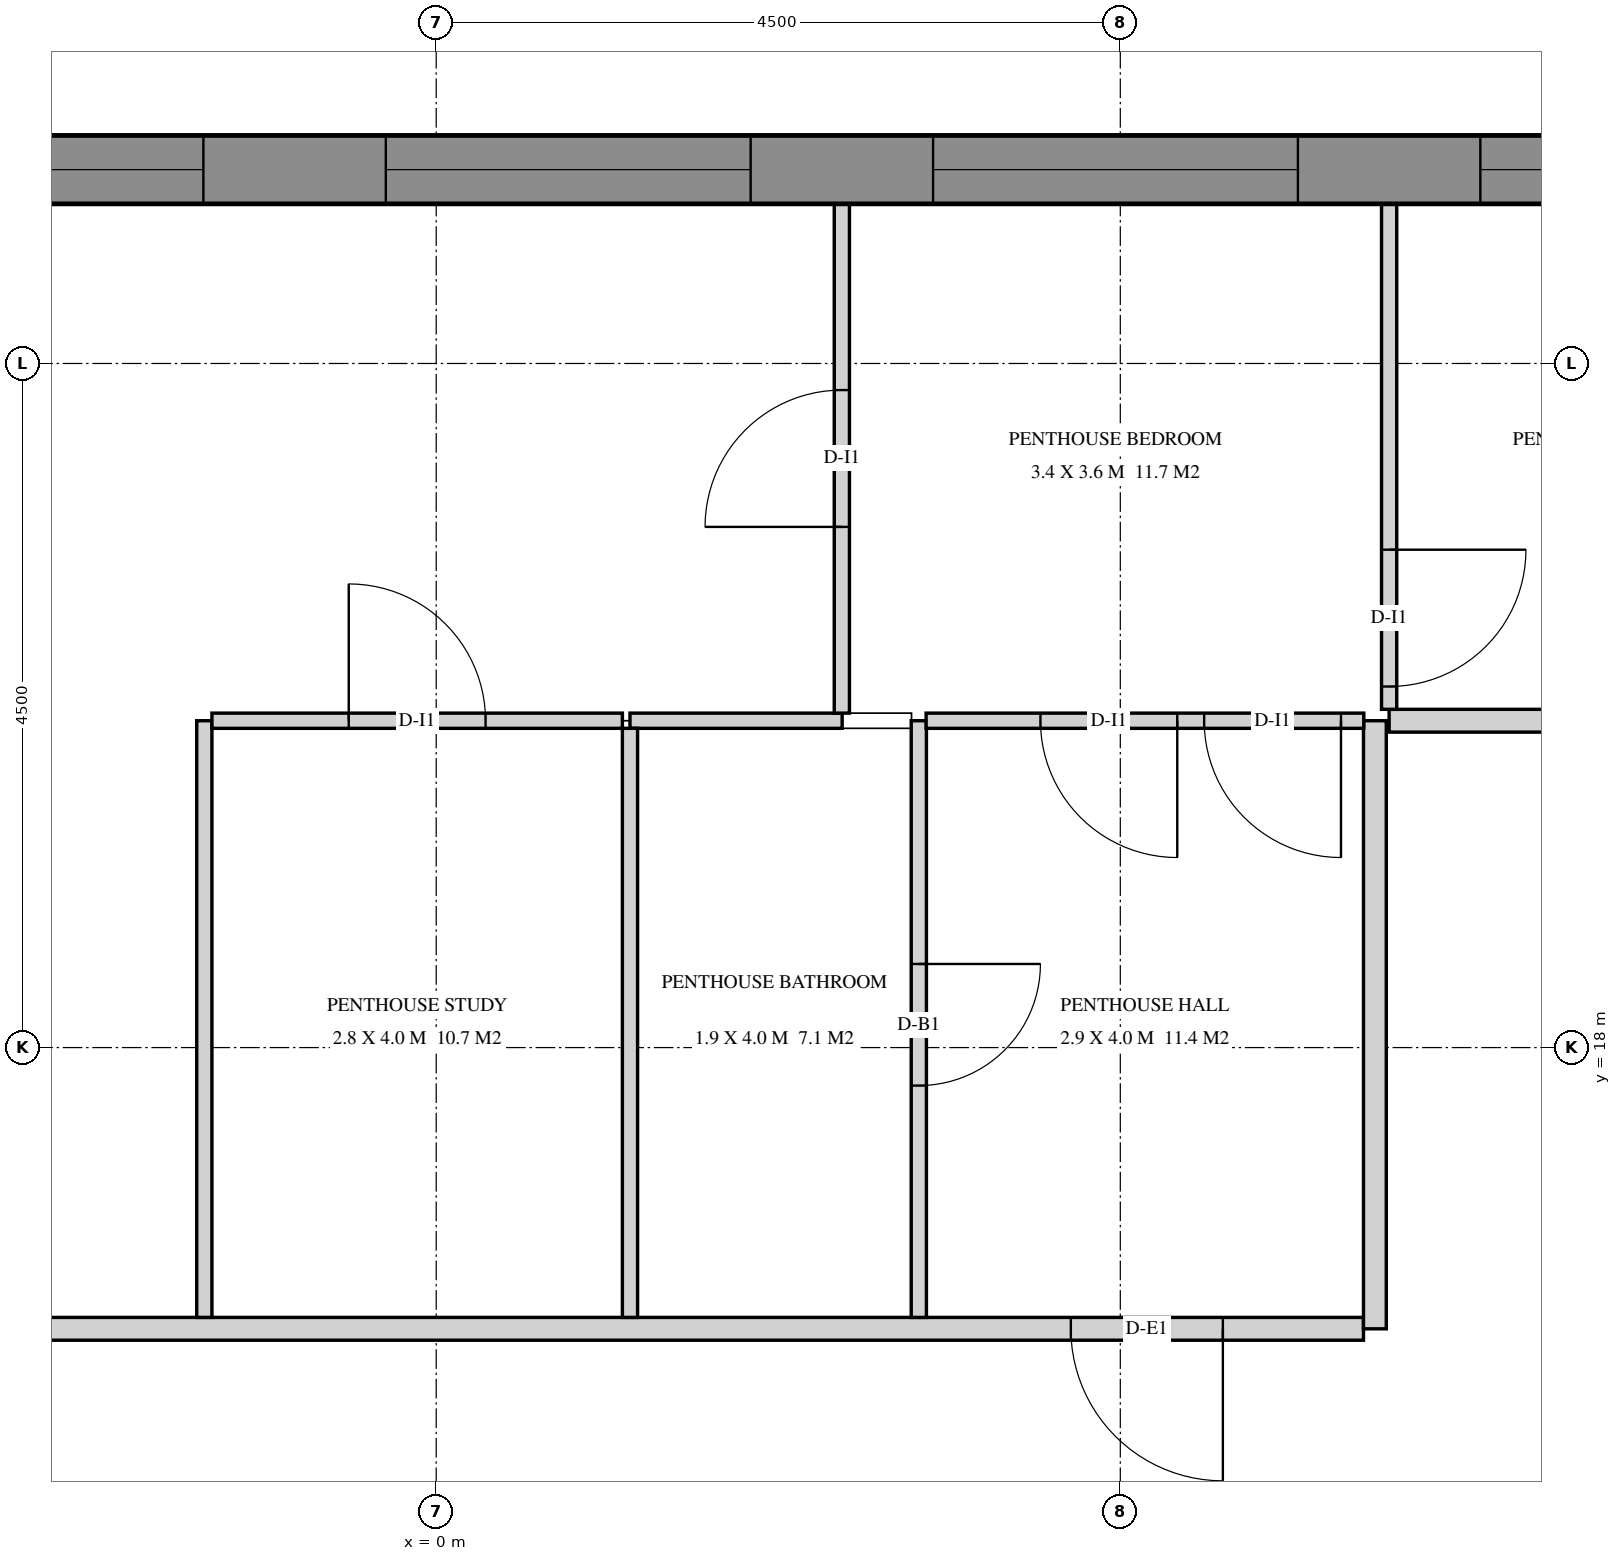
"""IFC4 building model, lengths in metres.
Left out: names, types, materials, properties, quantities, classifications, styles, units other than length and angle.
Written with IfcOpenShell. Run it as: python <this file> out.ifc"""

import sys

from ifc_helpers import new_model, si_unit, direction, frame, frame_2d, origin, place, context, subcontext, project, spatial, polyline, rectangle, outline, extrude, element, fill, save


model = new_model("IFC4")
c1 = context("Model", 3, precision=1e-05, world=origin(), true_north=direction((0.0, 1.0)))
c2 = subcontext(c1, "Body", "Model", "MODEL_VIEW")
j1 = project(units=[si_unit("LENGTHUNIT", "METRE"), si_unit("PLANEANGLEUNIT", "RADIAN")], contexts=[c1])
p1 = place(None, origin())
s1 = spatial("IfcSite", under=j1, at=p1, CompositionType="ELEMENT")
p2 = place(p1, origin())
s2 = spatial("IfcBuilding", under=s1, at=p2, CompositionType="ELEMENT")
p3 = place(p2, frame((0.0, 0.0, 349.5)))
s3 = spatial("IfcBuildingStorey", under=s2, at=p3, CompositionType="ELEMENT", Elevation=349.5)
p4 = place(p3, frame((10.634, 23.775, 0.0), z_axis=(0.0, 0.0, 1.0), x_axis=(-1.0, 0.0, 0.0)))
e1 = element("IfcWall", 1, at=p4, inside=s3, PredefinedType="SOLIDWALL", context=c2, shape_type="SweptSolid", body=[
    extrude(outline(polyline([(-0.018, -0.225), (23.153, -0.225), (23.111, 0.225), (0.018, 0.225), (-0.018, -0.225)])), origin(), (0.0, 0.0, 1.0), 3.75),
])
p5 = place(p4, frame((1.366, 0.0, 0.3)))
e2 = element("IfcOpeningElement", 2, at=p5, cuts=e1, PredefinedType="OPENING", context=c2, shape_type="SweptSolid", body=[
    extrude(rectangle(XDim=2.4, YDim=3.0, at=frame_2d((1.2, 1.5))), frame((0.0, 0.235, 0.0), z_axis=(0.0, -1.0, 0.0), x_axis=(1.0, 0.0, 0.0)), (0.0, 0.0, 1.0), 0.47),
])
p6 = place(p4, frame((4.966, 0.0, 0.3)))
e3 = element("IfcOpeningElement", 3, at=p6, cuts=e1, PredefinedType="OPENING", context=c2, shape_type="SweptSolid", body=[
    extrude(rectangle(XDim=2.4, YDim=3.0, at=frame_2d((1.2, 1.5))), frame((0.0, 0.235, 0.0), z_axis=(0.0, -1.0, 0.0), x_axis=(1.0, 0.0, 0.0)), (0.0, 0.0, 1.0), 0.47),
])
p7 = place(p4, frame((8.566, 0.0, 0.3)))
e4 = element("IfcOpeningElement", 4, at=p7, cuts=e1, PredefinedType="OPENING", context=c2, shape_type="SweptSolid", body=[
    extrude(rectangle(XDim=2.4, YDim=3.0, at=frame_2d((1.2, 1.5))), frame((0.0, 0.235, 0.0), z_axis=(0.0, -1.0, 0.0), x_axis=(1.0, 0.0, 0.0)), (0.0, 0.0, 1.0), 0.47),
])
p8 = place(p4, frame((12.166, 0.0, 0.3)))
e5 = element("IfcOpeningElement", 5, at=p8, cuts=e1, PredefinedType="OPENING", context=c2, shape_type="SweptSolid", body=[
    extrude(rectangle(XDim=2.4, YDim=3.0, at=frame_2d((1.2, 1.5))), frame((0.0, 0.235, 0.0), z_axis=(0.0, -1.0, 0.0), x_axis=(1.0, 0.0, 0.0)), (0.0, 0.0, 1.0), 0.47),
])
p9 = place(p4, frame((15.766, 0.0, 0.3)))
e6 = element("IfcOpeningElement", 6, at=p9, cuts=e1, PredefinedType="OPENING", context=c2, shape_type="SweptSolid", body=[
    extrude(rectangle(XDim=2.4, YDim=3.0, at=frame_2d((1.2, 1.5))), frame((0.0, 0.235, 0.0), z_axis=(0.0, -1.0, 0.0), x_axis=(1.0, 0.0, 0.0)), (0.0, 0.0, 1.0), 0.47),
])
p10 = place(p4, frame((19.366, 0.0, 0.3)))
e7 = element("IfcOpeningElement", 7, at=p10, cuts=e1, PredefinedType="OPENING", context=c2, shape_type="SweptSolid", body=[
    extrude(rectangle(XDim=2.4, YDim=3.0, at=frame_2d((1.2, 1.5))), frame((0.0, 0.235, 0.0), z_axis=(0.0, -1.0, 0.0), x_axis=(1.0, 0.0, 0.0)), (0.0, 0.0, 1.0), 0.47),
])
p11 = place(p3, frame((5.773, 10.0, 0.0), z_axis=(0.0, 0.0, 1.0), x_axis=(0.500007911273, 0.866020836161, 0.0)))
e8 = element("IfcWall", 8, at=p11, inside=s3, PredefinedType="SHEAR", context=c2, shape_type="SweptSolid", body=[
    extrude(rectangle(XDim=14.51, YDim=0.35, at=frame_2d((7.255, 0.0))), origin(), (0.0, 0.0, 1.0), 3.75),
])
p12 = place(p11, frame((6.355, 0.0, 0.0)))
e9 = element("IfcOpeningElement", 9, at=p12, cuts=e8, PredefinedType="OPENING", context=c2, shape_type="SweptSolid", body=[
    extrude(rectangle(XDim=1.8, YDim=2.4, at=frame_2d((0.9, 1.2))), frame((0.0, 0.185, 0.0), z_axis=(0.0, -1.0, 0.0), x_axis=(1.0, 0.0, 0.0)), (0.0, 0.0, 1.0), 0.37),
])
p13 = place(p3, frame((6.1, 16.15, 0.0), z_axis=(0.0, 0.0, 1.0), x_axis=(-1.0, 0.0, 0.0)))
e10 = element("IfcWall", 10, at=p13, inside=s3, PredefinedType="PARTITIONING", context=c2, shape_type="SweptSolid", body=[
    extrude(rectangle(XDim=13.966, YDim=0.15, at=frame_2d((6.983, 0.0))), origin(), (0.0, 0.0, 1.0), 2.82),
])
p14 = place(p13, frame((0.925, 0.0, 0.0)))
e11 = element("IfcOpeningElement", 11, at=p14, cuts=e10, PredefinedType="OPENING", context=c2, shape_type="SweptSolid", body=[
    extrude(rectangle(XDim=1.0, YDim=2.1, at=frame_2d((0.5, 1.05))), frame((0.0, 0.085, 0.0), z_axis=(0.0, -1.0, 0.0), x_axis=(1.0, 0.0, 0.0)), (0.0, 0.0, 1.0), 0.17),
])
p15 = place(p3, frame((6.175, 20.15, 0.0), z_axis=(0.0, 0.0, 1.0), x_axis=(0.0, -1.0, 0.0)))
e12 = element("IfcWall", 12, at=p15, inside=s3, PredefinedType="PARTITIONING", context=c2, shape_type="SweptSolid", body=[
    extrude(rectangle(XDim=4.0, YDim=0.15, at=frame_2d((2.0, 0.0))), origin(), (0.0, 0.0, 1.0), 2.82),
])
p16 = place(p3, frame((9.867, 20.15, 0.0), z_axis=(0.0, 0.0, 1.0), x_axis=(-1.0, 0.0, 0.0)))
e13 = element("IfcWall", 13, at=p16, inside=s3, PredefinedType="PARTITIONING", context=c2, shape_type="SweptSolid", body=[
    extrude(rectangle(XDim=3.599, YDim=0.15, at=frame_2d((1.799, 0.0))), origin(), (0.0, 0.0, 1.0), 2.82),
])
p17 = place(p3, frame((1.275, 20.15, 0.0), z_axis=(0.0, 0.0, 1.0), x_axis=(1.0, 0.0, 0.0)))
e14 = element("IfcWall", 14, at=p17, inside=s3, PredefinedType="PARTITIONING", context=c2, shape_type="SweptSolid", body=[
    extrude(rectangle(XDim=1.396, YDim=0.1, at=frame_2d((0.698, 0.0))), origin(), (0.0, 0.0, 1.0), 2.82),
])
p18 = place(p3, frame((2.668, 20.2, 0.0), z_axis=(0.0, 0.0, 1.0), x_axis=(0.0, 1.0, 0.0)))
e15 = element("IfcWall", 15, at=p18, inside=s3, PredefinedType="PARTITIONING", context=c2, shape_type="SweptSolid", body=[
    extrude(rectangle(XDim=3.35, YDim=0.1, at=frame_2d((1.675, 0.0))), origin(), (0.0, 0.0, 1.0), 2.82),
])
p19 = place(p18, frame((1.225, 0.0, 0.0)))
e16 = element("IfcOpeningElement", 16, at=p19, cuts=e15, PredefinedType="OPENING", context=c2, shape_type="SweptSolid", body=[
    extrude(rectangle(XDim=0.9, YDim=2.1, at=frame_2d((0.45, 1.05))), frame((0.0, 0.06, 0.0), z_axis=(0.0, -1.0, 0.0), x_axis=(1.0, 0.0, 0.0)), (0.0, 0.0, 1.0), 0.12),
])
p20 = place(p3, frame((-1.525, 16.225, 0.0), z_axis=(0.0, 0.0, 1.0), x_axis=(0.0, 1.0, 0.0)))
e17 = element("IfcWall", 17, at=p20, inside=s3, PredefinedType="PARTITIONING", context=c2, shape_type="SweptSolid", body=[
    extrude(rectangle(XDim=3.925, YDim=0.1, at=frame_2d((1.962, 0.0))), origin(), (0.0, 0.0, 1.0), 2.82),
])
p21 = place(p3, frame((-1.475, 20.15, 0.0), z_axis=(0.0, 0.0, 1.0), x_axis=(1.0, 0.0, 0.0)))
e18 = element("IfcWall", 18, at=p21, inside=s3, PredefinedType="PARTITIONING", context=c2, shape_type="SweptSolid", body=[
    extrude(rectangle(XDim=2.7, YDim=0.1, at=frame_2d((1.35, 0.0))), origin(), (0.0, 0.0, 1.0), 2.82),
])
p22 = place(p21, frame((0.9, 0.0, 0.0)))
e19 = element("IfcOpeningElement", 19, at=p22, cuts=e18, PredefinedType="OPENING", context=c2, shape_type="SweptSolid", body=[
    extrude(rectangle(XDim=0.9, YDim=2.1, at=frame_2d((0.45, 1.05))), frame((0.0, 0.06, 0.0), z_axis=(0.0, -1.0, 0.0), x_axis=(1.0, 0.0, 0.0)), (0.0, 0.0, 1.0), 0.12),
])
p23 = place(p3, frame((3.175, 20.15, 0.0), z_axis=(0.0, 0.0, 1.0), x_axis=(0.0, -1.0, 0.0)))
e20 = element("IfcWall", 20, at=p23, inside=s3, PredefinedType="PARTITIONING", context=c2, shape_type="SweptSolid", body=[
    extrude(rectangle(XDim=3.925, YDim=0.1, at=frame_2d((1.962, 0.0))), origin(), (0.0, 0.0, 1.0), 2.82),
])
p24 = place(p23, frame((1.6, 0.0, 0.0)))
e21 = element("IfcOpeningElement", 21, at=p24, cuts=e20, PredefinedType="OPENING", context=c2, shape_type="SweptSolid", body=[
    extrude(rectangle(XDim=0.8, YDim=2.1, at=frame_2d((0.4, 1.05))), frame((0.0, 0.06, 0.0), z_axis=(0.0, -1.0, 0.0), x_axis=(1.0, 0.0, 0.0)), (0.0, 0.0, 1.0), 0.12),
])
p25 = place(p3, frame((6.102, 20.15, 0.0), z_axis=(0.0, 0.0, 1.0), x_axis=(-1.0, 0.0, 0.0)))
e22 = element("IfcWall", 22, at=p25, inside=s3, PredefinedType="PARTITIONING", context=c2, shape_type="SweptSolid", body=[
    extrude(rectangle(XDim=2.879, YDim=0.1, at=frame_2d((1.439, 0.0))), origin(), (0.0, 0.0, 1.0), 2.82),
])
p26 = place(p25, frame((0.15, 0.0, 0.0)))
e23 = element("IfcOpeningElement", 23, at=p26, cuts=e22, PredefinedType="OPENING", context=c2, shape_type="SweptSolid", body=[
    extrude(rectangle(XDim=0.9, YDim=2.1, at=frame_2d((0.45, 1.05))), frame((0.0, 0.06, 0.0), z_axis=(0.0, -1.0, 0.0), x_axis=(1.0, 0.0, 0.0)), (0.0, 0.0, 1.0), 0.12),
])
p27 = place(p25, frame((1.227, 0.0, 0.0)))
e24 = element("IfcOpeningElement", 24, at=p27, cuts=e22, PredefinedType="OPENING", context=c2, shape_type="SweptSolid", body=[
    extrude(rectangle(XDim=0.9, YDim=2.1, at=frame_2d((0.45, 1.05))), frame((0.0, 0.06, 0.0), z_axis=(0.0, -1.0, 0.0), x_axis=(1.0, 0.0, 0.0)), (0.0, 0.0, 1.0), 0.12),
])
p28 = place(p3, frame((3.127, 20.15, 0.0), z_axis=(0.0, 0.0, 1.0), x_axis=(-1.0, 0.0, 0.0)))
e25 = element("IfcWall", 25, at=p28, inside=s3, PredefinedType="PARTITIONING", context=c2, shape_type="SweptSolid", body=[
    extrude(rectangle(XDim=0.458, YDim=0.1, at=frame_2d((0.229, 0.0))), origin(), (0.0, 0.0, 1.0), 2.82),
])
p29 = place(p3, frame((1.275, 20.1, 0.0), z_axis=(0.0, 0.0, 1.0), x_axis=(0.0, -1.0, 0.0)))
e26 = element("IfcWall", 26, at=p29, inside=s3, PredefinedType="PARTITIONING", context=c2, shape_type="SweptSolid", body=[
    extrude(rectangle(XDim=3.875, YDim=0.1, at=frame_2d((1.938, 0.0))), origin(), (0.0, 0.0, 1.0), 2.82),
])
p30 = place(p3, frame((6.268, 23.55, 0.0), z_axis=(0.0, 0.0, 1.0), x_axis=(0.0, -1.0, 0.0)))
e27 = element("IfcWall", 27, at=p30, inside=s3, PredefinedType="PARTITIONING", context=c2, shape_type="SweptSolid", body=[
    extrude(rectangle(XDim=3.325, YDim=0.1, at=frame_2d((1.663, 0.0))), origin(), (0.0, 0.0, 1.0), 2.82),
])
p31 = place(p30, frame((2.275, 0.0, 0.0)))
e28 = element("IfcOpeningElement", 28, at=p31, cuts=e27, PredefinedType="OPENING", context=c2, shape_type="SweptSolid", body=[
    extrude(rectangle(XDim=0.9, YDim=2.1, at=frame_2d((0.45, 1.05))), frame((0.0, 0.06, 0.0), z_axis=(0.0, -1.0, 0.0), x_axis=(1.0, 0.0, 0.0)), (0.0, 0.0, 1.0), 0.12),
])
p32 = place(p5, frame((0.0, 0.155, 0.0)))
e29 = element("IfcWindow", 29, at=p32, inside=s3, PartitioningType="DOUBLE_PANEL_VERTICAL", PredefinedType="WINDOW", context=c2, shape_type="SweptSolid", body=[
    extrude(rectangle(XDim=2.4, YDim=3.0, at=frame_2d((1.2, 1.5))), frame((0.0, 0.03, 0.0), z_axis=(0.0, -1.0, 0.0), x_axis=(1.0, 0.0, 0.0)), (0.0, 0.0, 1.0), 0.06),
])
fill(e2, e29)
p33 = place(p6, frame((0.0, 0.155, 0.0)))
e30 = element("IfcWindow", 30, at=p33, inside=s3, PartitioningType="DOUBLE_PANEL_VERTICAL", PredefinedType="WINDOW", context=c2, shape_type="SweptSolid", body=[
    extrude(rectangle(XDim=2.4, YDim=3.0, at=frame_2d((1.2, 1.5))), frame((0.0, 0.03, 0.0), z_axis=(0.0, -1.0, 0.0), x_axis=(1.0, 0.0, 0.0)), (0.0, 0.0, 1.0), 0.06),
])
fill(e3, e30)
p34 = place(p7, frame((0.0, 0.155, 0.0)))
e31 = element("IfcWindow", 31, at=p34, inside=s3, PartitioningType="DOUBLE_PANEL_VERTICAL", PredefinedType="WINDOW", context=c2, shape_type="SweptSolid", body=[
    extrude(rectangle(XDim=2.4, YDim=3.0, at=frame_2d((1.2, 1.5))), frame((0.0, 0.03, 0.0), z_axis=(0.0, -1.0, 0.0), x_axis=(1.0, 0.0, 0.0)), (0.0, 0.0, 1.0), 0.06),
])
fill(e4, e31)
p35 = place(p8, frame((0.0, 0.155, 0.0)))
e32 = element("IfcWindow", 32, at=p35, inside=s3, PartitioningType="DOUBLE_PANEL_VERTICAL", PredefinedType="WINDOW", context=c2, shape_type="SweptSolid", body=[
    extrude(rectangle(XDim=2.4, YDim=3.0, at=frame_2d((1.2, 1.5))), frame((0.0, 0.03, 0.0), z_axis=(0.0, -1.0, 0.0), x_axis=(1.0, 0.0, 0.0)), (0.0, 0.0, 1.0), 0.06),
])
fill(e5, e32)
p36 = place(p14, origin())
e33 = element("IfcDoor", 33, at=p36, inside=s3, OperationType="SINGLE_SWING_RIGHT", PredefinedType="DOOR", context=c2, shape_type="SweptSolid", body=[
    extrude(rectangle(XDim=1.0, YDim=2.1, at=frame_2d((0.5, 1.05))), frame((0.0, 0.025, 0.0), z_axis=(0.0, -1.0, 0.0), x_axis=(1.0, 0.0, 0.0)), (0.0, 0.0, 1.0), 0.05),
])
fill(e11, e33)
p37 = place(p24, origin())
e34 = element("IfcDoor", 34, at=p37, inside=s3, OperationType="SINGLE_SWING_LEFT", PredefinedType="DOOR", context=c2, shape_type="SweptSolid", body=[
    extrude(rectangle(XDim=0.8, YDim=2.1, at=frame_2d((0.4, 1.05))), frame((0.0, 0.025, 0.0), z_axis=(0.0, -1.0, 0.0), x_axis=(1.0, 0.0, 0.0)), (0.0, 0.0, 1.0), 0.05),
])
fill(e21, e34)
p38 = place(p26, origin())
e35 = element("IfcDoor", 35, at=p38, inside=s3, OperationType="SINGLE_SWING_LEFT", PredefinedType="DOOR", context=c2, shape_type="SweptSolid", body=[
    extrude(rectangle(XDim=0.9, YDim=2.1, at=frame_2d((0.45, 1.05))), frame((0.0, 0.025, 0.0), z_axis=(0.0, -1.0, 0.0), x_axis=(1.0, 0.0, 0.0)), (0.0, 0.0, 1.0), 0.05),
])
fill(e23, e35)
p39 = place(p31, origin())
e36 = element("IfcDoor", 36, at=p39, inside=s3, OperationType="SINGLE_SWING_RIGHT", PredefinedType="DOOR", context=c2, shape_type="SweptSolid", body=[
    extrude(rectangle(XDim=0.9, YDim=2.1, at=frame_2d((0.45, 1.05))), frame((0.0, 0.025, 0.0), z_axis=(0.0, -1.0, 0.0), x_axis=(1.0, 0.0, 0.0)), (0.0, 0.0, 1.0), 0.05),
])
fill(e28, e36)
p40 = place(p27, origin())
e37 = element("IfcDoor", 37, at=p40, inside=s3, OperationType="SINGLE_SWING_LEFT", PredefinedType="DOOR", context=c2, shape_type="SweptSolid", body=[
    extrude(rectangle(XDim=0.9, YDim=2.1, at=frame_2d((0.45, 1.05))), frame((0.0, 0.025, 0.0), z_axis=(0.0, -1.0, 0.0), x_axis=(1.0, 0.0, 0.0)), (0.0, 0.0, 1.0), 0.05),
])
fill(e24, e37)
p41 = place(p22, origin())
e38 = element("IfcDoor", 38, at=p41, inside=s3, OperationType="SINGLE_SWING_LEFT", PredefinedType="DOOR", context=c2, shape_type="SweptSolid", body=[
    extrude(rectangle(XDim=0.9, YDim=2.1, at=frame_2d((0.45, 1.05))), frame((0.0, 0.025, 0.0), z_axis=(0.0, -1.0, 0.0), x_axis=(1.0, 0.0, 0.0)), (0.0, 0.0, 1.0), 0.05),
])
fill(e19, e38)
p42 = place(p19, origin())
e39 = element("IfcDoor", 39, at=p42, inside=s3, OperationType="SINGLE_SWING_LEFT", PredefinedType="DOOR", context=c2, shape_type="SweptSolid", body=[
    extrude(rectangle(XDim=0.9, YDim=2.1, at=frame_2d((0.45, 1.05))), frame((0.0, 0.025, 0.0), z_axis=(0.0, -1.0, 0.0), x_axis=(1.0, 0.0, 0.0)), (0.0, 0.0, 1.0), 0.05),
])
fill(e16, e39)
save(model, sys.argv[1])
